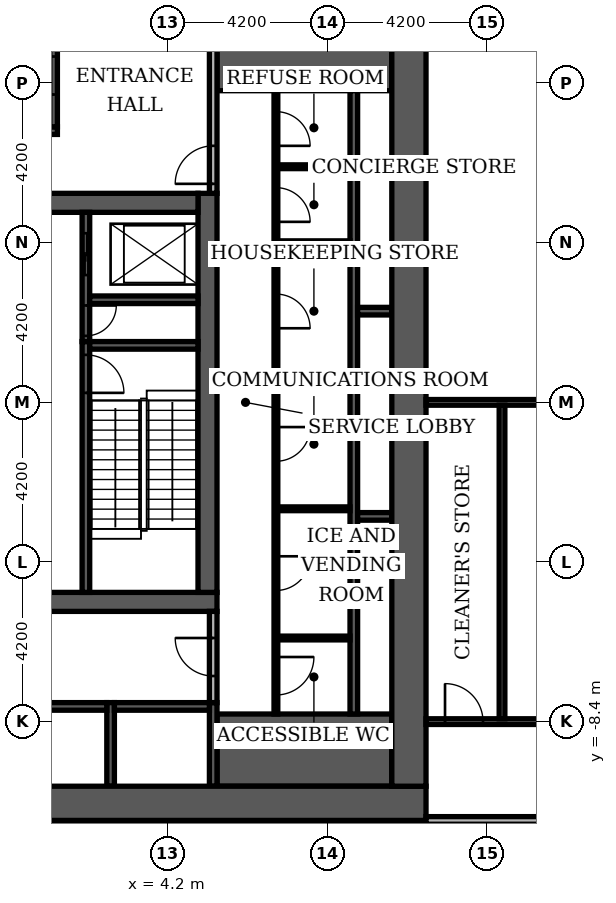
"""IFC4 building model, lengths in metres.
Left out: names, types, materials, properties, quantities, classifications, styles, units other than length and angle.
Written with IfcOpenShell. Run it as: python <this file> out.ifc"""

import sys

from ifc_helpers import new_model, si_unit, direction, frame, frame_2d, origin, place, context, subcontext, project, spatial, rectangle, extrude, element, fill, save


model = new_model("IFC4")
c1 = context("Model", 3, precision=1e-05, world=origin(), true_north=direction((0.0, 1.0)))
c2 = subcontext(c1, "Body", "Model", "MODEL_VIEW")
j1 = project(units=[si_unit("LENGTHUNIT", "METRE"), si_unit("PLANEANGLEUNIT", "RADIAN")], contexts=[c1])
p1 = place(None, origin())
s1 = spatial("IfcSite", under=j1, at=p1, CompositionType="ELEMENT")
p2 = place(p1, origin())
s2 = spatial("IfcBuilding", under=s1, at=p2, CompositionType="ELEMENT")
p3 = place(p2, frame((0.0, 0.0, 22.2)))
s3 = spatial("IfcBuildingStorey", under=s2, at=p3, CompositionType="ELEMENT", Elevation=22.2)
p4 = place(p3, frame((-5.5, -5.25, 0.0), z_axis=(0.0, 0.0, 1.0), x_axis=(1.0, 0.0, 0.0)))
e1 = element("IfcWall", 1, at=p4, inside=s3, PredefinedType="SHEAR", context=c2, shape_type="SweptSolid", body=[
    extrude(rectangle(XDim=11.0, YDim=0.5, at=frame_2d((5.5, 0.0))), origin(), (0.0, 0.0, 1.0), 4.3),
])
p5 = place(p4, frame((4.9, 0.0, 0.0)))
e2 = element("IfcOpeningElement", 2, at=p5, cuts=e1, PredefinedType="OPENING", context=c2, shape_type="SweptSolid", body=[
    extrude(rectangle(XDim=1.2, YDim=2.1, at=frame_2d((0.6, 1.05))), frame((0.0, 0.26, 0.0), z_axis=(0.0, -1.0, 0.0), x_axis=(1.0, 0.0, 0.0)), (0.0, 0.0, 1.0), 0.52),
])
p6 = place(p3, frame((5.25, -5.0, 0.0), z_axis=(0.0, 0.0, 1.0), x_axis=(0.0, 1.0, 0.0)))
e3 = element("IfcWall", 3, at=p6, inside=s3, PredefinedType="SHEAR", context=c2, shape_type="SweptSolid", body=[
    extrude(rectangle(XDim=10.5, YDim=0.5, at=frame_2d((5.25, 0.0))), origin(), (0.0, 0.0, 1.0), 4.3),
])
p7 = place(p3, frame((-5.0, 5.25, 0.0), z_axis=(0.0, 0.0, 1.0), x_axis=(1.0, 0.0, 0.0)))
e4 = element("IfcWall", 4, at=p7, inside=s3, PredefinedType="SHEAR", context=c2, shape_type="SweptSolid", body=[
    extrude(rectangle(XDim=10.0, YDim=0.5, at=frame_2d((5.0, 0.0))), origin(), (0.0, 0.0, 1.0), 4.3),
])
p8 = place(p7, frame((4.4, 0.0, 0.0)))
e5 = element("IfcOpeningElement", 5, at=p8, cuts=e4, PredefinedType="OPENING", context=c2, shape_type="SweptSolid", body=[
    extrude(rectangle(XDim=1.2, YDim=2.1, at=frame_2d((0.6, 1.05))), frame((0.0, 0.26, 0.0), z_axis=(0.0, -1.0, 0.0), x_axis=(1.0, 0.0, 0.0)), (0.0, 0.0, 1.0), 0.52),
])
for number, where, z_axis, x_axis in (
    (6, (5.5, -9.15, 0.0), (0.0, 0.0, 1.0), (1.0, 0.0, 0.0)),
    (7, (5.5, 9.15, 0.0), (0.0, 0.0, 1.0), (1.0, 0.0, 0.0)),
):
    element("IfcWall", number, at=place(p3, frame(where, z_axis=z_axis, x_axis=x_axis)), inside=s3, PredefinedType="SHEAR", context=c2, shape_type="SweptSolid", body=[
        extrude(rectangle(XDim=4.6, YDim=1.9, at=frame_2d((2.3, 0.0))), origin(), (0.0, 0.0, 1.0), 4.3),
    ])
p9 = place(p3, frame((2.05, -5.0, 0.0), z_axis=(0.0, 0.0, 1.0), x_axis=(0.0, 1.0, 0.0)))
e8 = element("IfcWall", 8, at=p9, inside=s3, PredefinedType="SHEAR", context=c2, shape_type="SweptSolid", body=[
    extrude(rectangle(XDim=6.6, YDim=0.2, at=frame_2d((3.3, 0.0))), origin(), (0.0, 0.0, 1.0), 4.3),
])
p10 = place(p9, frame((5.25, 0.0, 0.0)))
e9 = element("IfcOpeningElement", 9, at=p10, cuts=e8, PredefinedType="OPENING", context=c2, shape_type="SweptSolid", body=[
    extrude(rectangle(XDim=1.0, YDim=2.1, at=frame_2d((0.5, 1.05))), frame((0.0, 0.11, 0.0), z_axis=(0.0, -1.0, 0.0), x_axis=(1.0, 0.0, 0.0)), (0.0, 0.0, 1.0), 0.22),
])
p11 = place(p3, frame((2.15, 1.5, 0.0), z_axis=(0.0, 0.0, 1.0), x_axis=(1.0, 0.0, 0.0)))
e10 = element("IfcWall", 10, at=p11, inside=s3, PredefinedType="SHEAR", context=c2, shape_type="SweptSolid", body=[
    extrude(rectangle(XDim=2.85, YDim=0.2, at=frame_2d((1.425, 0.0))), origin(), (0.0, 0.0, 1.0), 4.3),
])
p12 = place(p3, frame((-5.5, 7.15, 0.0), z_axis=(0.0, 0.0, 1.0), x_axis=(1.0, 0.0, 0.0)))
e11 = element("IfcWall", 11, at=p12, inside=s3, PredefinedType="SHEAR", context=c2, shape_type="SweptSolid", body=[
    extrude(rectangle(XDim=6.8, YDim=0.2, at=frame_2d((3.4, 0.0))), origin(), (0.0, 0.0, 1.0), 4.3),
])
p13 = place(p3, frame((1.2, 7.25, 0.0), z_axis=(0.0, 0.0, 1.0), x_axis=(0.0, 1.0, 0.0)))
e12 = element("IfcWall", 12, at=p13, inside=s3, PredefinedType="SHEAR", context=c2, shape_type="SweptSolid", body=[
    extrude(rectangle(XDim=2.85, YDim=0.2, at=frame_2d((1.425, 0.0))), origin(), (0.0, 0.0, 1.0), 4.3),
])
p14 = place(p13, frame((0.85, 0.0, 0.0)))
e13 = element("IfcOpeningElement", 13, at=p14, cuts=e12, PredefinedType="OPENING", context=c2, shape_type="SweptSolid", body=[
    extrude(rectangle(XDim=1.0, YDim=2.1, at=frame_2d((0.5, 1.05))), frame((0.0, 0.11, 0.0), z_axis=(0.0, -1.0, 0.0), x_axis=(1.0, 0.0, 0.0)), (0.0, 0.0, 1.0), 0.22),
])
for number, where, z_axis, x_axis in (
    (14, (2.7, -10.1, 0.0), (0.0, 0.0, 1.0), (0.0, 1.0, 0.0)),
    (15, (5.4, -10.1, 0.0), (0.0, 0.0, 1.0), (0.0, 1.0, 0.0)),
):
    element("IfcWall", number, at=place(p3, frame(where, z_axis=z_axis, x_axis=x_axis)), inside=s3, PredefinedType="SHEAR", context=c2, shape_type="SweptSolid", body=[
        extrude(rectangle(XDim=2.2, YDim=0.2, at=frame_2d((1.1, 0.0))), origin(), (0.0, 0.0, 1.0), 4.3),
    ])
p15 = place(p3, frame((9.1, -8.2, 0.0), z_axis=(0.0, 0.0, 1.0), x_axis=(0.0, 1.0, 0.0)))
e16 = element("IfcWall", 16, at=p15, inside=s3, PredefinedType="SHEAR", context=c2, shape_type="SweptSolid", body=[
    extrude(rectangle(XDim=16.4, YDim=0.2, at=frame_2d((8.2, 0.0))), origin(), (0.0, 0.0, 1.0), 4.3),
])
for number, where, z_axis, x_axis in (
    (17, (0.1, -8.0, 0.0), (0.0, 0.0, 1.0), (1.0, 0.0, 0.0)),
    (18, (2.8, -8.0, 0.0), (0.0, 0.0, 1.0), (1.0, 0.0, 0.0)),
):
    element("IfcWall", number, at=place(p3, frame(where, z_axis=z_axis, x_axis=x_axis)), inside=s3, PredefinedType="SHEAR", context=c2, shape_type="SweptSolid", body=[
        extrude(rectangle(XDim=2.5, YDim=0.2, at=frame_2d((1.25, 0.0))), origin(), (0.0, 0.0, 1.0), 4.3),
    ])
p16 = place(p3, frame((9.2, -3.0, 0.0), z_axis=(0.0, 0.0, 1.0), x_axis=(1.0, 0.0, 0.0)))
e19 = element("IfcWall", 19, at=p16, inside=s3, PredefinedType="SHEAR", context=c2, shape_type="SweptSolid", body=[
    extrude(rectangle(XDim=0.9, YDim=0.2, at=frame_2d((0.45, 0.0))), origin(), (0.0, 0.0, 1.0), 4.3),
])
p17 = place(p3, frame((2.05, 1.6, 0.0), z_axis=(0.0, 0.0, 1.0), x_axis=(0.0, 1.0, 0.0)))
e20 = element("IfcWall", 20, at=p17, inside=s3, PredefinedType="SHEAR", context=c2, shape_type="SweptSolid", body=[
    extrude(rectangle(XDim=3.4, YDim=0.2, at=frame_2d((1.7, 0.0))), origin(), (0.0, 0.0, 1.0), 4.3),
])
p18 = place(p17, frame((1.75, 0.0, 0.0)))
e21 = element("IfcOpeningElement", 21, at=p18, cuts=e20, PredefinedType="OPENING", context=c2, shape_type="SweptSolid", body=[
    extrude(rectangle(XDim=1.1, YDim=2.1, at=frame_2d((0.55, 1.05))), frame((0.0, 0.11, 0.0), z_axis=(0.0, -1.0, 0.0), x_axis=(1.0, 0.0, 0.0)), (0.0, 0.0, 1.0), 0.22),
])
p19 = place(p17, frame((0.15, 0.0, 0.0)))
e22 = element("IfcOpeningElement", 22, at=p19, cuts=e20, PredefinedType="OPENING", context=c2, shape_type="SweptSolid", body=[
    extrude(rectangle(XDim=0.8, YDim=2.1, at=frame_2d((0.4, 1.05))), frame((0.0, 0.11, 0.0), z_axis=(0.0, -1.0, 0.0), x_axis=(1.0, 0.0, 0.0)), (0.0, 0.0, 1.0), 0.22),
])
p20 = place(p3, frame((9.2, 2.4, 0.0), z_axis=(0.0, 0.0, 1.0), x_axis=(1.0, 0.0, 0.0)))
e23 = element("IfcWall", 23, at=p20, inside=s3, PredefinedType="SHEAR", context=c2, shape_type="SweptSolid", body=[
    extrude(rectangle(XDim=0.9, YDim=0.2, at=frame_2d((0.45, 0.0))), origin(), (0.0, 0.0, 1.0), 4.3),
])
p21 = place(p3, frame((2.15, 2.7, 0.0), z_axis=(0.0, 0.0, 1.0), x_axis=(1.0, 0.0, 0.0)))
e24 = element("IfcWall", 24, at=p21, inside=s3, PredefinedType="SHEAR", context=c2, shape_type="SweptSolid", body=[
    extrude(rectangle(XDim=2.85, YDim=0.2, at=frame_2d((1.425, 0.0))), origin(), (0.0, 0.0, 1.0), 4.3),
])
p22 = place(p3, frame((-11.0, -10.55, 0.0), z_axis=(0.0, 0.0, 1.0), x_axis=(1.0, 0.0, 0.0)))
e25 = element("IfcWall", 25, at=p22, inside=s3, PredefinedType="SHEAR", context=c2, shape_type="SweptSolid", body=[
    extrude(rectangle(XDim=22.0, YDim=0.9, at=frame_2d((11.0, 0.0))), origin(), (0.0, 0.0, 1.0), 4.3),
])
p23 = place(p22, frame((7.4, 0.0, 0.0)))
e26 = element("IfcOpeningElement", 26, at=p23, cuts=e25, PredefinedType="OPENING", context=c2, shape_type="SweptSolid", body=[
    extrude(rectangle(XDim=1.8, YDim=2.2, at=frame_2d((0.9, 1.1))), frame((0.0, 0.46, 0.0), z_axis=(0.0, -1.0, 0.0), x_axis=(1.0, 0.0, 0.0)), (0.0, 0.0, 1.0), 0.92),
])
p24 = place(p3, frame((10.55, -10.1, 0.0), z_axis=(0.0, 0.0, 1.0), x_axis=(0.0, 1.0, 0.0)))
e27 = element("IfcWall", 27, at=p24, inside=s3, PredefinedType="SHEAR", context=c2, shape_type="SweptSolid", body=[
    extrude(rectangle(XDim=20.2, YDim=0.9, at=frame_2d((10.1, 0.0))), origin(), (0.0, 0.0, 1.0), 4.3),
])
p25 = place(p3, frame((7.05, -8.2, 0.0), z_axis=(0.0, 0.0, 1.0), x_axis=(0.0, 1.0, 0.0)))
e28 = element("IfcWall", 28, at=p25, inside=s3, PredefinedType="PARTITIONING", context=c2, shape_type="SweptSolid", body=[
    extrude(rectangle(XDim=16.4, YDim=0.1, at=frame_2d((8.2, 0.0))), origin(), (0.0, 0.0, 1.0), 4.3),
])
p26 = place(p25, frame((0.5, 0.0, 0.0)))
e29 = element("IfcOpeningElement", 29, at=p26, cuts=e28, PredefinedType="OPENING", context=c2, shape_type="SweptSolid", body=[
    extrude(rectangle(XDim=1.0, YDim=2.1, at=frame_2d((0.5, 1.05))), frame((0.0, 0.06, 0.0), z_axis=(0.0, -1.0, 0.0), x_axis=(1.0, 0.0, 0.0)), (0.0, 0.0, 1.0), 0.12),
])
p27 = place(p25, frame((3.25, 0.0, 0.0)))
e30 = element("IfcOpeningElement", 30, at=p27, cuts=e28, PredefinedType="OPENING", context=c2, shape_type="SweptSolid", body=[
    extrude(rectangle(XDim=0.9, YDim=2.1, at=frame_2d((0.45, 1.05))), frame((0.0, 0.06, 0.0), z_axis=(0.0, -1.0, 0.0), x_axis=(1.0, 0.0, 0.0)), (0.0, 0.0, 1.0), 0.12),
])
p28 = place(p25, frame((6.65, 0.0, 0.0)))
e31 = element("IfcOpeningElement", 31, at=p28, cuts=e28, PredefinedType="OPENING", context=c2, shape_type="SweptSolid", body=[
    extrude(rectangle(XDim=0.9, YDim=2.1, at=frame_2d((0.45, 1.05))), frame((0.0, 0.06, 0.0), z_axis=(0.0, -1.0, 0.0), x_axis=(1.0, 0.0, 0.0)), (0.0, 0.0, 1.0), 0.12),
])
p29 = place(p25, frame((10.15, 0.0, 0.0)))
e32 = element("IfcOpeningElement", 32, at=p29, cuts=e28, PredefinedType="OPENING", context=c2, shape_type="SweptSolid", body=[
    extrude(rectangle(XDim=0.9, YDim=2.1, at=frame_2d((0.45, 1.05))), frame((0.0, 0.06, 0.0), z_axis=(0.0, -1.0, 0.0), x_axis=(1.0, 0.0, 0.0)), (0.0, 0.0, 1.0), 0.12),
])
p30 = place(p25, frame((12.95, 0.0, 0.0)))
e33 = element("IfcOpeningElement", 33, at=p30, cuts=e28, PredefinedType="OPENING", context=c2, shape_type="SweptSolid", body=[
    extrude(rectangle(XDim=0.9, YDim=2.1, at=frame_2d((0.45, 1.05))), frame((0.0, 0.06, 0.0), z_axis=(0.0, -1.0, 0.0), x_axis=(1.0, 0.0, 0.0)), (0.0, 0.0, 1.0), 0.12),
])
p31 = place(p25, frame((14.95, 0.0, 0.0)))
e34 = element("IfcOpeningElement", 34, at=p31, cuts=e28, PredefinedType="OPENING", context=c2, shape_type="SweptSolid", body=[
    extrude(rectangle(XDim=0.9, YDim=2.1, at=frame_2d((0.45, 1.05))), frame((0.0, 0.06, 0.0), z_axis=(0.0, -1.0, 0.0), x_axis=(1.0, 0.0, 0.0)), (0.0, 0.0, 1.0), 0.12),
])
p32 = place(p3, frame((5.4, -7.9, 0.0), z_axis=(0.0, 0.0, 1.0), x_axis=(0.0, 1.0, 0.0)))
e35 = element("IfcWall", 35, at=p32, inside=s3, PredefinedType="PARTITIONING", context=c2, shape_type="SweptSolid", body=[
    extrude(rectangle(XDim=2.4, YDim=0.2, at=frame_2d((1.2, 0.0))), origin(), (0.0, 0.0, 1.0), 4.3),
])
p33 = place(p32, frame((0.7, 0.0, 0.0)))
e36 = element("IfcOpeningElement", 36, at=p33, cuts=e35, PredefinedType="OPENING", context=c2, shape_type="SweptSolid", body=[
    extrude(rectangle(XDim=1.0, YDim=2.1, at=frame_2d((0.5, 1.05))), frame((0.0, 0.11, 0.0), z_axis=(0.0, -1.0, 0.0), x_axis=(1.0, 0.0, 0.0)), (0.0, 0.0, 1.0), 0.22),
])
for number, where, z_axis, x_axis in (
    (37, (7.1, -6.2, 0.0), (0.0, 0.0, 1.0), (1.0, 0.0, 0.0)),
    (38, (7.1, -2.8, 0.0), (0.0, 0.0, 1.0), (1.0, 0.0, 0.0)),
    (39, (7.1, 0.6, 0.0), (0.0, 0.0, 1.0), (1.0, 0.0, 0.0)),
    (40, (7.1, 4.2, 0.0), (0.0, 0.0, 1.0), (1.0, 0.0, 0.0)),
):
    element("IfcWall", number, at=place(p3, frame(where, z_axis=z_axis, x_axis=x_axis)), inside=s3, PredefinedType="PARTITIONING", context=c2, shape_type="SweptSolid", body=[
        extrude(rectangle(XDim=1.9, YDim=0.1, at=frame_2d((0.95, 0.0))), origin(), (0.0, 0.0, 1.0), 4.3),
    ])
p34 = place(p3, frame((5.4, 5.5, 0.0), z_axis=(0.0, 0.0, 1.0), x_axis=(0.0, 1.0, 0.0)))
e41 = element("IfcWall", 41, at=p34, inside=s3, PredefinedType="PARTITIONING", context=c2, shape_type="SweptSolid", body=[
    extrude(rectangle(XDim=4.6, YDim=0.2, at=frame_2d((2.3, 0.0))), origin(), (0.0, 0.0, 1.0), 4.3),
])
p35 = place(p34, frame((0.25, 0.0, 0.0)))
e42 = element("IfcOpeningElement", 42, at=p35, cuts=e41, PredefinedType="OPENING", context=c2, shape_type="SweptSolid", body=[
    extrude(rectangle(XDim=1.0, YDim=2.1, at=frame_2d((0.5, 1.05))), frame((0.0, 0.11, 0.0), z_axis=(0.0, -1.0, 0.0), x_axis=(1.0, 0.0, 0.0)), (0.0, 0.0, 1.0), 0.22),
])
p36 = place(p3, frame((7.1, 6.2, 0.0), z_axis=(0.0, 0.0, 1.0), x_axis=(1.0, 0.0, 0.0)))
e43 = element("IfcWall", 43, at=p36, inside=s3, PredefinedType="PARTITIONING", context=c2, shape_type="SweptSolid", body=[
    extrude(rectangle(XDim=1.9, YDim=0.1, at=frame_2d((0.95, 0.0))), origin(), (0.0, 0.0, 1.0), 4.3),
])
p37 = place(p3, frame((11.0, -11.0, 0.0), z_axis=(0.0, 0.0, 1.0), x_axis=(1.0, 0.0, 0.0)))
e44 = element("IfcWall", 44, at=p37, inside=s3, PredefinedType="PARTITIONING", context=c2, shape_type="SweptSolid", body=[
    extrude(rectangle(XDim=14.3, YDim=0.2, at=frame_2d((7.15, 0.0))), origin(), (0.0, 0.0, 1.0), 4.3),
])
p38 = place(p37, frame((6.5, 0.0, 0.0)))
e45 = element("IfcOpeningElement", 45, at=p38, cuts=e44, PredefinedType="OPENING", context=c2, shape_type="SweptSolid", body=[
    extrude(rectangle(XDim=1.2, YDim=2.2, at=frame_2d((0.6, 1.1))), frame((0.0, 0.11, 0.0), z_axis=(0.0, -1.0, 0.0), x_axis=(1.0, 0.0, 0.0)), (0.0, 0.0, 1.0), 0.22),
])
p39 = place(p3, frame((11.0, -8.4, 0.0), z_axis=(0.0, 0.0, 1.0), x_axis=(1.0, 0.0, 0.0)))
e46 = element("IfcWall", 46, at=p39, inside=s3, PredefinedType="PARTITIONING", context=c2, shape_type="SweptSolid", body=[
    extrude(rectangle(XDim=13.6, YDim=0.15, at=frame_2d((6.8, 0.0))), origin(), (0.0, 0.0, 1.0), 4.3),
])
p40 = place(p39, frame((0.5, 0.0, 0.0)))
e47 = element("IfcOpeningElement", 47, at=p40, cuts=e46, PredefinedType="OPENING", context=c2, shape_type="SweptSolid", body=[
    extrude(rectangle(XDim=1.0, YDim=2.1, at=frame_2d((0.5, 1.05))), frame((0.0, 0.085, 0.0), z_axis=(0.0, -1.0, 0.0), x_axis=(1.0, 0.0, 0.0)), (0.0, 0.0, 1.0), 0.17),
])
p41 = place(p39, frame((3.7, 0.0, 0.0)))
e48 = element("IfcOpeningElement", 48, at=p41, cuts=e46, PredefinedType="OPENING", context=c2, shape_type="SweptSolid", body=[
    extrude(rectangle(XDim=1.0, YDim=2.1, at=frame_2d((0.5, 1.05))), frame((0.0, 0.085, 0.0), z_axis=(0.0, -1.0, 0.0), x_axis=(1.0, 0.0, 0.0)), (0.0, 0.0, 1.0), 0.17),
])
p42 = place(p39, frame((8.1, 0.0, 0.0)))
e49 = element("IfcOpeningElement", 49, at=p42, cuts=e46, PredefinedType="OPENING", context=c2, shape_type="SweptSolid", body=[
    extrude(rectangle(XDim=1.0, YDim=2.1, at=frame_2d((0.5, 1.05))), frame((0.0, 0.085, 0.0), z_axis=(0.0, -1.0, 0.0), x_axis=(1.0, 0.0, 0.0)), (0.0, 0.0, 1.0), 0.17),
])
p43 = place(p39, frame((11.3, 0.0, 0.0)))
e50 = element("IfcOpeningElement", 50, at=p43, cuts=e46, PredefinedType="OPENING", context=c2, shape_type="SweptSolid", body=[
    extrude(rectangle(XDim=1.0, YDim=2.1, at=frame_2d((0.5, 1.05))), frame((0.0, 0.085, 0.0), z_axis=(0.0, -1.0, 0.0), x_axis=(1.0, 0.0, 0.0)), (0.0, 0.0, 1.0), 0.17),
])
p44 = place(p3, frame((11.0, 0.0, 0.0), z_axis=(0.0, 0.0, 1.0), x_axis=(1.0, 0.0, 0.0)))
e51 = element("IfcWall", 51, at=p44, inside=s3, PredefinedType="PARTITIONING", context=c2, shape_type="SweptSolid", body=[
    extrude(rectangle(XDim=13.6, YDim=0.15, at=frame_2d((6.8, 0.0))), origin(), (0.0, 0.0, 1.0), 4.3),
])
p45 = place(p3, frame((13.0, -8.325, 0.0), z_axis=(0.0, 0.0, 1.0), x_axis=(0.0, 1.0, 0.0)))
e52 = element("IfcWall", 52, at=p45, inside=s3, PredefinedType="PARTITIONING", context=c2, shape_type="SweptSolid", body=[
    extrude(rectangle(XDim=8.25, YDim=0.15, at=frame_2d((4.125, 0.0))), origin(), (0.0, 0.0, 1.0), 4.3),
])
p46 = place(p18, origin())
e53 = element("IfcDoor", 53, at=p46, inside=s3, OperationType="SLIDING_TO_LEFT", PredefinedType="DOOR", context=c2, shape_type="SweptSolid", body=[
    extrude(rectangle(XDim=1.1, YDim=2.1, at=frame_2d((0.55, 1.05))), frame((0.0, 0.025, 0.0), z_axis=(0.0, -1.0, 0.0), x_axis=(1.0, 0.0, 0.0)), (0.0, 0.0, 1.0), 0.05),
])
fill(e21, e53)
p47 = place(p10, frame((1.0, 0.0, 0.0), z_axis=(0.0, 0.0, 1.0), x_axis=(-1.0, 0.0, 0.0)))
e54 = element("IfcDoor", 54, at=p47, inside=s3, OperationType="SINGLE_SWING_LEFT", PredefinedType="DOOR", context=c2, shape_type="SweptSolid", body=[
    extrude(rectangle(XDim=1.0, YDim=2.1, at=frame_2d((0.5, 1.05))), frame((0.0, 0.025, 0.0), z_axis=(0.0, -1.0, 0.0), x_axis=(1.0, 0.0, 0.0)), (0.0, 0.0, 1.0), 0.05),
])
fill(e9, e54)
p48 = place(p19, frame((0.8, 0.0, 0.0), z_axis=(0.0, 0.0, 1.0), x_axis=(-1.0, 0.0, 0.0)))
e55 = element("IfcDoor", 55, at=p48, inside=s3, OperationType="SINGLE_SWING_RIGHT", PredefinedType="DOOR", context=c2, shape_type="SweptSolid", body=[
    extrude(rectangle(XDim=0.8, YDim=2.1, at=frame_2d((0.4, 1.05))), frame((0.0, 0.025, 0.0), z_axis=(0.0, -1.0, 0.0), x_axis=(1.0, 0.0, 0.0)), (0.0, 0.0, 1.0), 0.05),
])
fill(e22, e55)
p49 = place(p14, origin())
e56 = element("IfcDoor", 56, at=p49, inside=s3, OperationType="SINGLE_SWING_LEFT", PredefinedType="DOOR", context=c2, shape_type="SweptSolid", body=[
    extrude(rectangle(XDim=1.0, YDim=2.1, at=frame_2d((0.5, 1.05))), frame((0.0, 0.025, 0.0), z_axis=(0.0, -1.0, 0.0), x_axis=(1.0, 0.0, 0.0)), (0.0, 0.0, 1.0), 0.05),
])
fill(e13, e56)
p50 = place(p35, origin())
e57 = element("IfcDoor", 57, at=p50, inside=s3, OperationType="SINGLE_SWING_LEFT", PredefinedType="DOOR", context=c2, shape_type="SweptSolid", body=[
    extrude(rectangle(XDim=1.0, YDim=2.1, at=frame_2d((0.5, 1.05))), frame((0.0, 0.025, 0.0), z_axis=(0.0, -1.0, 0.0), x_axis=(1.0, 0.0, 0.0)), (0.0, 0.0, 1.0), 0.05),
])
fill(e42, e57)
p51 = place(p33, origin())
e58 = element("IfcDoor", 58, at=p51, inside=s3, OperationType="SINGLE_SWING_RIGHT", PredefinedType="DOOR", context=c2, shape_type="SweptSolid", body=[
    extrude(rectangle(XDim=1.0, YDim=2.1, at=frame_2d((0.5, 1.05))), frame((0.0, 0.025, 0.0), z_axis=(0.0, -1.0, 0.0), x_axis=(1.0, 0.0, 0.0)), (0.0, 0.0, 1.0), 0.05),
])
fill(e36, e58)
p52 = place(p26, frame((1.0, 0.0, 0.0), z_axis=(0.0, 0.0, 1.0), x_axis=(-1.0, 0.0, 0.0)))
e59 = element("IfcDoor", 59, at=p52, inside=s3, OperationType="SINGLE_SWING_RIGHT", PredefinedType="DOOR", context=c2, shape_type="SweptSolid", body=[
    extrude(rectangle(XDim=1.0, YDim=2.1, at=frame_2d((0.5, 1.05))), frame((0.0, 0.025, 0.0), z_axis=(0.0, -1.0, 0.0), x_axis=(1.0, 0.0, 0.0)), (0.0, 0.0, 1.0), 0.05),
])
fill(e29, e59)
p53 = place(p27, frame((0.9, 0.0, 0.0), z_axis=(0.0, 0.0, 1.0), x_axis=(-1.0, 0.0, 0.0)))
e60 = element("IfcDoor", 60, at=p53, inside=s3, OperationType="SINGLE_SWING_RIGHT", PredefinedType="DOOR", context=c2, shape_type="SweptSolid", body=[
    extrude(rectangle(XDim=0.9, YDim=2.1, at=frame_2d((0.45, 1.05))), frame((0.0, 0.025, 0.0), z_axis=(0.0, -1.0, 0.0), x_axis=(1.0, 0.0, 0.0)), (0.0, 0.0, 1.0), 0.05),
])
fill(e30, e60)
p54 = place(p28, frame((0.9, 0.0, 0.0), z_axis=(0.0, 0.0, 1.0), x_axis=(-1.0, 0.0, 0.0)))
e61 = element("IfcDoor", 61, at=p54, inside=s3, OperationType="SINGLE_SWING_RIGHT", PredefinedType="DOOR", context=c2, shape_type="SweptSolid", body=[
    extrude(rectangle(XDim=0.9, YDim=2.1, at=frame_2d((0.45, 1.05))), frame((0.0, 0.025, 0.0), z_axis=(0.0, -1.0, 0.0), x_axis=(1.0, 0.0, 0.0)), (0.0, 0.0, 1.0), 0.05),
])
fill(e31, e61)
p55 = place(p29, frame((0.9, 0.0, 0.0), z_axis=(0.0, 0.0, 1.0), x_axis=(-1.0, 0.0, 0.0)))
e62 = element("IfcDoor", 62, at=p55, inside=s3, OperationType="SINGLE_SWING_LEFT", PredefinedType="DOOR", context=c2, shape_type="SweptSolid", body=[
    extrude(rectangle(XDim=0.9, YDim=2.1, at=frame_2d((0.45, 1.05))), frame((0.0, 0.025, 0.0), z_axis=(0.0, -1.0, 0.0), x_axis=(1.0, 0.0, 0.0)), (0.0, 0.0, 1.0), 0.05),
])
fill(e32, e62)
p56 = place(p30, frame((0.9, 0.0, 0.0), z_axis=(0.0, 0.0, 1.0), x_axis=(-1.0, 0.0, 0.0)))
e63 = element("IfcDoor", 63, at=p56, inside=s3, OperationType="SINGLE_SWING_LEFT", PredefinedType="DOOR", context=c2, shape_type="SweptSolid", body=[
    extrude(rectangle(XDim=0.9, YDim=2.1, at=frame_2d((0.45, 1.05))), frame((0.0, 0.025, 0.0), z_axis=(0.0, -1.0, 0.0), x_axis=(1.0, 0.0, 0.0)), (0.0, 0.0, 1.0), 0.05),
])
fill(e33, e63)
p57 = place(p31, frame((0.9, 0.0, 0.0), z_axis=(0.0, 0.0, 1.0), x_axis=(-1.0, 0.0, 0.0)))
e64 = element("IfcDoor", 64, at=p57, inside=s3, OperationType="SINGLE_SWING_LEFT", PredefinedType="DOOR", context=c2, shape_type="SweptSolid", body=[
    extrude(rectangle(XDim=0.9, YDim=2.1, at=frame_2d((0.45, 1.05))), frame((0.0, 0.025, 0.0), z_axis=(0.0, -1.0, 0.0), x_axis=(1.0, 0.0, 0.0)), (0.0, 0.0, 1.0), 0.05),
])
fill(e34, e64)
p58 = place(p40, origin())
e65 = element("IfcDoor", 65, at=p58, inside=s3, OperationType="SINGLE_SWING_LEFT", PredefinedType="DOOR", context=c2, shape_type="SweptSolid", body=[
    extrude(rectangle(XDim=1.0, YDim=2.1, at=frame_2d((0.5, 1.05))), frame((0.0, 0.025, 0.0), z_axis=(0.0, -1.0, 0.0), x_axis=(1.0, 0.0, 0.0)), (0.0, 0.0, 1.0), 0.05),
])
fill(e47, e65)
save(model, sys.argv[1])
